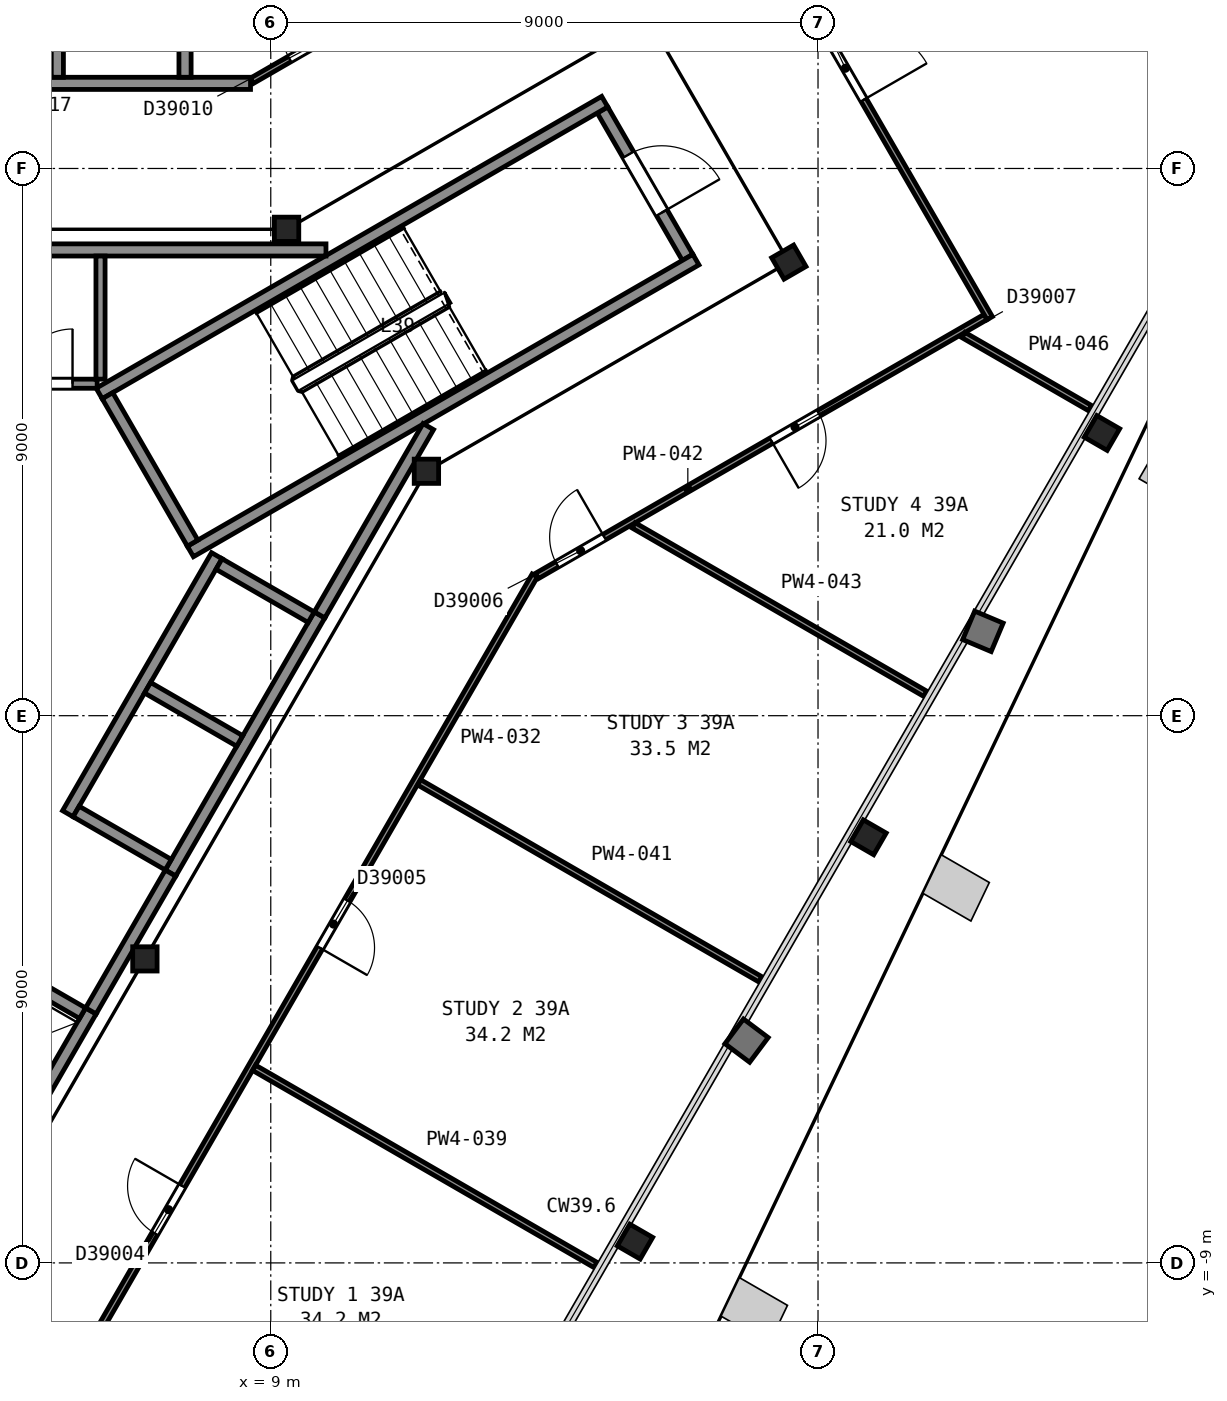
"""IFC4 building model, lengths in metres.
Left out: names, types, materials, properties, quantities, classifications, styles, units other than length and angle.
Written with IfcOpenShell. Run it as: python <this file> out.ifc"""

import sys

from ifc_helpers import new_model, si_unit, direction, frame, frame_2d, origin, origin_2d, place, context, subcontext, project, spatial, rectangle, i_section, extrude, element, fill, save


model = new_model("IFC4")
c1 = context("Model", 3, precision=1e-05, world=origin(), true_north=direction((0.0, 1.0)))
c2 = subcontext(c1, "Body", "Model", "MODEL_VIEW")
j1 = project(units=[si_unit("LENGTHUNIT", "METRE"), si_unit("PLANEANGLEUNIT", "RADIAN")], contexts=[c1])
p1 = place(None, origin())
s1 = spatial("IfcSite", under=j1, at=p1, CompositionType="ELEMENT")
p2 = place(p1, origin())
s2 = spatial("IfcBuilding", under=s1, at=p2, CompositionType="ELEMENT")
p3 = place(p2, frame((0.0, 0.0, 159.9)))
s3 = spatial("IfcBuildingStorey", under=s2, at=p3, CompositionType="ELEMENT", Elevation=159.9)
for number, where, z_axis, x_axis in (
    (1, (14.99, -8.65, 0.035), (0.0, 0.0, 1.0), (-0.5, -0.866, 0.0)),
    (2, (18.83, -2.0, 0.035), (0.0, 0.0, 1.0), (-0.5, -0.866, 0.0)),
):
    element("IfcColumn", number, at=place(p3, frame(where, z_axis=z_axis, x_axis=x_axis)), inside=s3, PredefinedType="COLUMN", context=c2, shape_type="SweptSolid", body=[
        extrude(i_section(OverallWidth=0.411, OverallDepth=0.434, WebThickness=0.036, FlangeThickness=0.057, FilletRadius=0.015, at=origin_2d()), origin(), (0.0, 0.0, 1.0), 3.665),
    ])
p4 = place(p3, frame((22.67, 4.65, 0.04), z_axis=(0.0, 0.0, 1.0), x_axis=(-0.5, -0.866025403784, 0.0)))
e3 = element("IfcColumn", 3, at=p4, inside=s3, PredefinedType="COLUMN", context=c2, shape_type="SweptSolid", body=[
    extrude(i_section(OverallWidth=0.411, OverallDepth=0.434, WebThickness=0.036, FlangeThickness=0.057, FilletRadius=0.015, at=origin_2d()), origin(), (0.0, 0.0, 1.0), 3.66),
])
p5 = place(p3, frame((11.56, 4.02, 0.0), z_axis=(0.0, 0.0, 1.0), x_axis=(1.0, 0.0, 0.0)))
e4 = element("IfcColumn", 4, at=p5, inside=s3, PredefinedType="COLUMN", context=c2, shape_type="SweptSolid", body=[
    extrude(i_section(OverallWidth=0.401, OverallDepth=0.399, WebThickness=0.025, FlangeThickness=0.04, FilletRadius=0.015, at=origin_2d()), origin(), (0.0, 0.0, 1.0), 3.7),
])
p6 = place(p3, frame((17.52, 7.46, 0.0), z_axis=(0.0, 0.0, 1.0), x_axis=(0.5, -0.866025403784, 0.0)))
e5 = element("IfcColumn", 5, at=p6, inside=s3, PredefinedType="COLUMN", context=c2, shape_type="SweptSolid", body=[
    extrude(i_section(OverallWidth=0.406, OverallDepth=0.417, WebThickness=0.03, FlangeThickness=0.048, FilletRadius=0.015, at=origin_2d()), origin(), (0.0, 0.0, 1.0), 3.7),
])
for number, where, z_axis, x_axis in (
    (6, (9.26, 8.0, 0.0), (0.0, 0.0, 1.0), (1.0, 0.0, 0.0)),
    (7, (6.93, -4.0, 0.0), (0.0, 0.0, 1.0), (1.0, 0.0, 0.0)),
):
    element("IfcColumn", number, at=place(p3, frame(where, z_axis=z_axis, x_axis=x_axis)), inside=s3, PredefinedType="COLUMN", context=c2, shape_type="SweptSolid", body=[
        extrude(i_section(OverallWidth=0.401, OverallDepth=0.399, WebThickness=0.025, FlangeThickness=0.04, FilletRadius=0.015, at=origin_2d()), origin(), (0.0, 0.0, 1.0), 3.7),
    ])
p7 = place(p3, frame((15.855, 7.538, 0.0), z_axis=(0.0, 0.0, 1.0), x_axis=(-0.500049511043, 0.865996816683, 0.0)))
e8 = element("IfcWall", 8, at=p7, inside=s3, PredefinedType="PARTITIONING", context=c2, shape_type="SweptSolid", body=[
    extrude(rectangle(XDim=2.8, YDim=0.2, at=frame_2d((1.4, 0.0))), origin(), (0.0, 0.0, 1.0), 3.45),
])
p8 = place(p7, frame((0.85, 0.0, 0.0)))
e9 = element("IfcOpeningElement", 9, at=p8, cuts=e8, PredefinedType="OPENING", context=c2, shape_type="SweptSolid", body=[
    extrude(rectangle(XDim=1.1, YDim=2.1, at=frame_2d((0.55, 1.05))), frame((0.0, 0.11, 0.0), z_axis=(0.0, -1.0, 0.0), x_axis=(1.0, 0.0, 0.0)), (0.0, 0.0, 1.0), 0.22),
])
for number, where, z_axis, x_axis in (
    (10, (6.178, 5.299, 0.0), (0.0, 0.0, 1.0), (0.866, 0.5, 0.0)),
    (11, (7.678, 2.701, 0.0), (0.0, 0.0, 1.0), (0.866, 0.5, 0.0)),
):
    element("IfcWall", number, at=place(p3, frame(where, z_axis=z_axis, x_axis=x_axis)), inside=s3, PredefinedType="PARTITIONING", context=c2, shape_type="SweptSolid", body=[
        extrude(rectangle(XDim=9.6, YDim=0.2, at=frame_2d((4.8, 0.0))), origin(), (0.0, 0.0, 1.0), 3.45),
    ])
p9 = place(p3, frame((7.715, 2.838, 0.0), z_axis=(0.0, 0.0, 1.0), x_axis=(-0.500049511043, 0.865996816683, 0.0)))
e12 = element("IfcWall", 12, at=p9, inside=s3, PredefinedType="PARTITIONING", context=c2, shape_type="SweptSolid", body=[
    extrude(rectangle(XDim=2.8, YDim=0.2, at=frame_2d((1.4, 0.0))), origin(), (0.0, 0.0, 1.0), 3.45),
])
p10 = place(p3, frame((4.766, -7.065, 0.0), z_axis=(0.0, 0.0, 1.0), x_axis=(0.499948979701, 0.866054858364, 0.0)))
e13 = element("IfcWall", 13, at=p10, inside=s3, PredefinedType="PARTITIONING", context=c2, shape_type="SweptSolid", body=[
    extrude(rectangle(XDim=2.55, YDim=0.2, at=frame_2d((1.275, 0.0))), origin(), (0.0, 0.0, 1.0), 3.7),
])
p11 = place(p3, frame((7.351, -2.587, 0.0), z_axis=(0.0, 0.0, 1.0), x_axis=(0.500002801628, 0.866023786258, 0.0)))
e14 = element("IfcWall", 14, at=p11, inside=s3, PredefinedType="PARTITIONING", context=c2, shape_type="SweptSolid", body=[
    extrude(rectangle(XDim=4.9, YDim=0.2, at=frame_2d((2.45, 0.0))), origin(), (0.0, 0.0, 1.0), 3.7),
])
p12 = place(p3, frame((5.663, -1.612, 0.0), z_axis=(0.0, 0.0, 1.0), x_axis=(0.49998122708, 0.866036242063, 0.0)))
e15 = element("IfcWall", 15, at=p12, inside=s3, PredefinedType="PARTITIONING", context=c2, shape_type="SweptSolid", body=[
    extrude(rectangle(XDim=4.9, YDim=0.2, at=frame_2d((2.45, 0.0))), origin(), (0.0, 0.0, 1.0), 3.7),
])
p13 = place(p3, frame((9.665, 1.62, 0.0), z_axis=(0.0, 0.0, 1.0), x_axis=(-0.866002029911, 0.500040482552, 0.0)))
e16 = element("IfcWall", 16, at=p13, inside=s3, PredefinedType="PARTITIONING", context=c2, shape_type="SweptSolid", body=[
    extrude(rectangle(XDim=1.75, YDim=0.2, at=frame_2d((0.875, 0.0))), origin(), (0.0, 0.0, 1.0), 3.7),
])
for number, where, z_axis, x_axis in (
    (17, (8.49, -0.416, 0.0), (0.0, 0.0, 1.0), (-0.866, 0.5, 0.0)),
    (18, (7.315, -2.451, 0.0), (0.0, 0.0, 1.0), (-0.866, 0.5, 0.0)),
):
    element("IfcWall", number, at=place(p3, frame(where, z_axis=z_axis, x_axis=x_axis)), inside=s3, PredefinedType="PARTITIONING", context=c2, shape_type="SweptSolid", body=[
        extrude(rectangle(XDim=1.75, YDim=0.2, at=frame_2d((0.875, 0.0))), origin(), (0.0, 0.0, 1.0), 3.7),
    ])
p14 = place(p3, frame((5.905, -4.893, 0.0), z_axis=(0.0, 0.0, 1.0), x_axis=(-0.866002029911, 0.500040482552, 0.0)))
e19 = element("IfcWall", 19, at=p14, inside=s3, PredefinedType="PARTITIONING", context=c2, shape_type="SweptSolid", body=[
    extrude(rectangle(XDim=1.75, YDim=0.2, at=frame_2d((0.875, 0.0))), origin(), (0.0, 0.0, 1.0), 3.7),
])
p15 = place(p3, frame((-3.933, 7.66, 0.0), z_axis=(0.0, 0.0, 1.0), x_axis=(1.0, 0.0, 0.0)))
e20 = element("IfcWall", 20, at=p15, inside=s3, PredefinedType="PARTITIONING", context=c2, shape_type="SweptSolid", body=[
    extrude(rectangle(XDim=13.841, YDim=0.2, at=frame_2d((6.92, 0.0))), origin(), (0.0, 0.0, 1.0), 3.45),
])
p16 = place(p3, frame((0.925, 5.46, 0.0), z_axis=(0.0, 0.0, 1.0), x_axis=(1.0, 0.0, 0.0)))
e21 = element("IfcWall", 21, at=p16, inside=s3, PredefinedType="PARTITIONING", context=c2, shape_type="SweptSolid", body=[
    extrude(rectangle(XDim=5.22, YDim=0.15, at=frame_2d((2.61, 0.0))), origin(), (0.0, 0.0, 1.0), 3.45),
])
p17 = place(p16, frame((3.915, 0.0, 0.0)))
e22 = element("IfcOpeningElement", 22, at=p17, cuts=e21, PredefinedType="OPENING", context=c2, shape_type="SweptSolid", body=[
    extrude(rectangle(XDim=0.9, YDim=2.1, at=frame_2d((0.45, 1.05))), frame((0.0, 0.085, 0.0), z_axis=(0.0, -1.0, 0.0), x_axis=(1.0, 0.0, 0.0)), (0.0, 0.0, 1.0), 0.17),
])
p18 = place(p3, frame((6.042, -4.855, 0.0), z_axis=(0.0, 0.0, 1.0), x_axis=(0.500252727967, 0.865879442048, 0.0)))
e23 = element("IfcWall", 23, at=p18, inside=s3, PredefinedType="PARTITIONING", context=c2, shape_type="SweptSolid", body=[
    extrude(rectangle(XDim=2.617, YDim=0.2, at=frame_2d((1.309, 0.0))), origin(), (0.0, 0.0, 1.0), 3.45),
])
p19 = place(p3, frame((6.2, 5.535, 0.0), z_axis=(0.0, 0.0, 1.0), x_axis=(0.0, 1.0, 0.0)))
e24 = element("IfcWall", 24, at=p19, inside=s3, PredefinedType="PARTITIONING", context=c2, shape_type="SweptSolid", body=[
    extrude(rectangle(XDim=2.025, YDim=0.15, at=frame_2d((1.013, 0.0))), origin(), (0.0, 0.0, 1.0), 3.45),
])
p20 = place(p3, frame((9.803, 1.658, 0.0), z_axis=(0.0, 0.0, 1.0), x_axis=(0.499943114462, 0.866058244174, 0.0)))
e25 = element("IfcWall", 25, at=p20, inside=s3, PredefinedType="PARTITIONING", context=c2, shape_type="SweptSolid", body=[
    extrude(rectangle(XDim=3.576, YDim=0.2, at=frame_2d((1.788, 0.0))), origin(), (0.0, 0.0, 1.0), 3.45),
])
p21 = place(p3, frame((-8.667, 10.4, 0.0), z_axis=(0.0, 0.0, 1.0), x_axis=(1.0, 0.0, 0.0)))
e26 = element("IfcWall", 26, at=p21, inside=s3, PredefinedType="PARTITIONING", context=c2, shape_type="SweptSolid", body=[
    extrude(rectangle(XDim=17.334, YDim=0.2, at=frame_2d((8.667, 0.0))), origin(), (0.0, 0.0, 1.0), 2.713),
])
p22 = place(p21, frame((9.211, 0.0, 0.0)))
e27 = element("IfcOpeningElement", 27, at=p22, cuts=e26, PredefinedType="OPENING", context=c2, shape_type="SweptSolid", body=[
    extrude(rectangle(XDim=0.9, YDim=2.1, at=frame_2d((0.45, 1.05))), frame((0.0, 0.11, 0.0), z_axis=(0.0, -1.0, 0.0), x_axis=(1.0, 0.0, 0.0)), (0.0, 0.0, 1.0), 0.22),
])
p23 = place(p21, frame((4.857, 0.0, 0.0)))
e28 = element("IfcOpeningElement", 28, at=p23, cuts=e26, PredefinedType="OPENING", context=c2, shape_type="SweptSolid", body=[
    extrude(rectangle(XDim=0.9, YDim=2.1, at=frame_2d((0.45, 1.05))), frame((0.0, 0.11, 0.0), z_axis=(0.0, -1.0, 0.0), x_axis=(1.0, 0.0, 0.0)), (0.0, 0.0, 1.0), 0.22),
])
p24 = place(p21, frame((1.0, 0.0, 0.0)))
e29 = element("IfcOpeningElement", 29, at=p24, cuts=e26, PredefinedType="OPENING", context=c2, shape_type="SweptSolid", body=[
    extrude(rectangle(XDim=0.9, YDim=2.1, at=frame_2d((0.45, 1.05))), frame((0.0, 0.11, 0.0), z_axis=(0.0, -1.0, 0.0), x_axis=(1.0, 0.0, 0.0)), (0.0, 0.0, 1.0), 0.22),
])
p25 = place(p3, frame((13.342, 2.306, 0.0), z_axis=(0.0, 0.0, 1.0), x_axis=(-0.49997635812, -0.866039053, 0.0)))
e30 = element("IfcWall", 30, at=p25, inside=s3, PredefinedType="PARTITIONING", context=c2, shape_type="SweptSolid", body=[
    extrude(rectangle(XDim=17.285, YDim=0.1, at=frame_2d((8.643, 0.0))), origin(), (0.0, 0.0, 1.0), 2.713),
])
p26 = place(p25, frame((15.585, 0.0, 0.0)))
e31 = element("IfcOpeningElement", 31, at=p26, cuts=e30, PredefinedType="OPENING", context=c2, shape_type="SweptSolid", body=[
    extrude(rectangle(XDim=0.9, YDim=2.1, at=frame_2d((0.45, 1.05))), frame((0.0, 0.06, 0.0), z_axis=(0.0, -1.0, 0.0), x_axis=(1.0, 0.0, 0.0)), (0.0, 0.0, 1.0), 0.12),
])
p27 = place(p25, frame((11.595, 0.0, 0.0)))
e32 = element("IfcOpeningElement", 32, at=p27, cuts=e30, PredefinedType="OPENING", context=c2, shape_type="SweptSolid", body=[
    extrude(rectangle(XDim=0.9, YDim=2.1, at=frame_2d((0.45, 1.05))), frame((0.0, 0.06, 0.0), z_axis=(0.0, -1.0, 0.0), x_axis=(1.0, 0.0, 0.0)), (0.0, 0.0, 1.0), 0.12),
])
p28 = place(p25, frame((6.171, 0.0, 0.0)))
e33 = element("IfcOpeningElement", 33, at=p28, cuts=e30, PredefinedType="OPENING", context=c2, shape_type="SweptSolid", body=[
    extrude(rectangle(XDim=0.9, YDim=2.1, at=frame_2d((0.45, 1.05))), frame((0.0, 0.06, 0.0), z_axis=(0.0, -1.0, 0.0), x_axis=(1.0, 0.0, 0.0)), (0.0, 0.0, 1.0), 0.12),
])
p29 = place(p3, frame((5.49, 10.5, 0.0), z_axis=(0.0, 0.0, 1.0), x_axis=(0.0, 1.0, 0.0)))
e34 = element("IfcWall", 34, at=p29, inside=s3, PredefinedType="PARTITIONING", context=c2, shape_type="SweptSolid", body=[
    extrude(rectangle(XDim=6.435, YDim=0.2, at=frame_2d((3.218, 0.0))), origin(), (0.0, 0.0, 1.0), 2.713),
])
p30 = place(p3, frame((7.59, 10.5, 0.0), z_axis=(0.0, 0.0, 1.0), x_axis=(0.0, 1.0, 0.0)))
e35 = element("IfcWall", 35, at=p30, inside=s3, PredefinedType="PARTITIONING", context=c2, shape_type="SweptSolid", body=[
    extrude(rectangle(XDim=2.8, YDim=0.2, at=frame_2d((1.4, 0.0))), origin(), (0.0, 0.0, 1.0), 2.713),
])
p31 = place(p3, frame((8.691, 10.442, 0.0), z_axis=(0.0, 0.0, 1.0), x_axis=(0.866070360466, 0.499922124658, 0.0)))
e36 = element("IfcWall", 36, at=p31, inside=s3, PredefinedType="PARTITIONING", context=c2, shape_type="SweptSolid", body=[
    extrude(rectangle(XDim=8.503, YDim=0.1, at=frame_2d((4.251, 0.0))), origin(), (0.0, 0.0, 1.0), 2.713),
])
p32 = place(p31, frame((4.758, 0.0, 0.0)))
e37 = element("IfcOpeningElement", 37, at=p32, cuts=e36, PredefinedType="OPENING", context=c2, shape_type="SweptSolid", body=[
    extrude(rectangle(XDim=0.9, YDim=2.1, at=frame_2d((0.45, 1.05))), frame((0.0, 0.06, 0.0), z_axis=(0.0, -1.0, 0.0), x_axis=(1.0, 0.0, 0.0)), (0.0, 0.0, 1.0), 0.12),
])
p33 = place(p31, frame((0.715, 0.0, 0.0)))
e38 = element("IfcOpeningElement", 38, at=p33, cuts=e36, PredefinedType="OPENING", context=c2, shape_type="SweptSolid", body=[
    extrude(rectangle(XDim=0.9, YDim=2.1, at=frame_2d((0.45, 1.05))), frame((0.0, 0.06, 0.0), z_axis=(0.0, -1.0, 0.0), x_axis=(1.0, 0.0, 0.0)), (0.0, 0.0, 1.0), 0.12),
])
p34 = place(p3, frame((8.725, -5.791, 0.0), z_axis=(0.0, 0.0, 1.0), x_axis=(0.865998075994, -0.500047330135, 0.0)))
e39 = element("IfcWall", 39, at=p34, inside=s3, PredefinedType="PARTITIONING", context=c2, shape_type="SweptSolid", body=[
    extrude(rectangle(XDim=6.483, YDim=0.1, at=frame_2d((3.242, 0.0))), origin(), (0.0, 0.0, 1.0), 2.713),
])
p35 = place(p3, frame((11.441, -1.096, 0.0), z_axis=(0.0, 0.0, 1.0), x_axis=(0.866019919364, -0.500009499175, 0.0)))
e40 = element("IfcWall", 40, at=p35, inside=s3, PredefinedType="PARTITIONING", context=c2, shape_type="SweptSolid", body=[
    extrude(rectangle(XDim=6.479, YDim=0.1, at=frame_2d((3.239, 0.0))), origin(), (0.0, 0.0, 1.0), 2.713),
])
p36 = place(p3, frame((20.756, 6.557, 0.0), z_axis=(0.0, 0.0, 1.0), x_axis=(-0.866069146081, -0.499924228466, 0.0)))
e41 = element("IfcWall", 41, at=p36, inside=s3, PredefinedType="PARTITIONING", context=c2, shape_type="SweptSolid", body=[
    extrude(rectangle(XDim=8.519, YDim=0.1, at=frame_2d((4.259, 0.0))), origin(), (0.0, 0.0, 1.0), 2.713),
])
p37 = place(p36, frame((7.239, 0.0, 0.0)))
e42 = element("IfcOpeningElement", 42, at=p37, cuts=e41, PredefinedType="OPENING", context=c2, shape_type="SweptSolid", body=[
    extrude(rectangle(XDim=0.9, YDim=2.1, at=frame_2d((0.45, 1.05))), frame((0.0, 0.06, 0.0), z_axis=(0.0, -1.0, 0.0), x_axis=(1.0, 0.0, 0.0)), (0.0, 0.0, 1.0), 0.12),
])
p38 = place(p36, frame((3.169, 0.0, 0.0)))
e43 = element("IfcOpeningElement", 43, at=p38, cuts=e41, PredefinedType="OPENING", context=c2, shape_type="SweptSolid", body=[
    extrude(rectangle(XDim=0.9, YDim=2.1, at=frame_2d((0.45, 1.05))), frame((0.0, 0.06, 0.0), z_axis=(0.0, -1.0, 0.0), x_axis=(1.0, 0.0, 0.0)), (0.0, 0.0, 1.0), 0.12),
])
p39 = place(p3, frame((14.968, 3.13, 0.0), z_axis=(0.0, 0.0, 1.0), x_axis=(0.866001282423, -0.500041777097, 0.0)))
e44 = element("IfcWall", 44, at=p39, inside=s3, PredefinedType="PARTITIONING", context=c2, shape_type="SweptSolid", body=[
    extrude(rectangle(XDim=5.537, YDim=0.1, at=frame_2d((2.769, 0.0))), origin(), (0.0, 0.0, 1.0), 2.713),
])
p40 = place(p3, frame((16.073, 14.761, 0.0), z_axis=(0.0, 0.0, 1.0), x_axis=(0.500297300687, -0.865853689098, 0.0)))
e45 = element("IfcWall", 45, at=p40, inside=s3, PredefinedType="PARTITIONING", context=c2, shape_type="SweptSolid", body=[
    extrude(rectangle(XDim=9.496, YDim=0.1, at=frame_2d((4.748, 0.0))), origin(), (0.0, 0.0, 1.0), 2.713),
])
p41 = place(p40, frame((4.15, 0.0, 0.0)))
e46 = element("IfcOpeningElement", 46, at=p41, cuts=e45, PredefinedType="OPENING", context=c2, shape_type="SweptSolid", body=[
    extrude(rectangle(XDim=1.2, YDim=2.1, at=frame_2d((0.6, 1.05))), frame((0.0, 0.06, 0.0), z_axis=(0.0, -1.0, 0.0), x_axis=(1.0, 0.0, 0.0)), (0.0, 0.0, 1.0), 0.12),
])
p42 = place(p3, frame((20.392, 6.261, 0.0), z_axis=(0.0, 0.0, 1.0), x_axis=(0.865953976614, -0.500123695086, 0.0)))
e47 = element("IfcWall", 47, at=p42, inside=s3, PredefinedType="PARTITIONING", context=c2, shape_type="SweptSolid", body=[
    extrude(rectangle(XDim=2.405, YDim=0.1, at=frame_2d((1.203, 0.0))), origin(), (0.0, 0.0, 1.0), 2.713),
])
p43 = place(p8, origin())
e48 = element("IfcDoor", 48, at=p43, inside=s3, OperationType="SINGLE_SWING_LEFT", PredefinedType="DOOR", context=c2, shape_type="SweptSolid", body=[
    extrude(rectangle(XDim=1.1, YDim=2.1, at=frame_2d((0.55, 1.05))), frame((0.0, 0.025, 0.0), z_axis=(0.0, -1.0, 0.0), x_axis=(1.0, 0.0, 0.0)), (0.0, 0.0, 1.0), 0.05),
])
fill(e9, e48)
p44 = place(p17, origin())
e49 = element("IfcDoor", 49, at=p44, inside=s3, OperationType="SINGLE_SWING_RIGHT", PredefinedType="DOOR", context=c2, shape_type="SweptSolid", body=[
    extrude(rectangle(XDim=0.9, YDim=2.1, at=frame_2d((0.45, 1.05))), frame((0.0, 0.025, 0.0), z_axis=(0.0, -1.0, 0.0), x_axis=(1.0, 0.0, 0.0)), (0.0, 0.0, 1.0), 0.05),
])
fill(e22, e49)
p45 = place(p27, origin())
e50 = element("IfcDoor", 50, at=p45, inside=s3, OperationType="SINGLE_SWING_LEFT", PredefinedType="DOOR", context=c2, shape_type="SweptSolid", body=[
    extrude(rectangle(XDim=0.9, YDim=2.1, at=frame_2d((0.45, 1.05))), frame((0.0, 0.025, 0.0), z_axis=(0.0, -1.0, 0.0), x_axis=(1.0, 0.0, 0.0)), (0.0, 0.0, 1.0), 0.05),
])
fill(e32, e50)
p46 = place(p28, origin())
e51 = element("IfcDoor", 51, at=p46, inside=s3, OperationType="SINGLE_SWING_RIGHT", PredefinedType="DOOR", context=c2, shape_type="SweptSolid", body=[
    extrude(rectangle(XDim=0.9, YDim=2.1, at=frame_2d((0.45, 1.05))), frame((0.0, 0.025, 0.0), z_axis=(0.0, -1.0, 0.0), x_axis=(1.0, 0.0, 0.0)), (0.0, 0.0, 1.0), 0.05),
])
fill(e33, e51)
p47 = place(p33, origin())
e52 = element("IfcDoor", 52, at=p47, inside=s3, OperationType="SINGLE_SWING_RIGHT", PredefinedType="DOOR", context=c2, shape_type="SweptSolid", body=[
    extrude(rectangle(XDim=0.9, YDim=2.1, at=frame_2d((0.45, 1.05))), frame((0.0, 0.025, 0.0), z_axis=(0.0, -1.0, 0.0), x_axis=(1.0, 0.0, 0.0)), (0.0, 0.0, 1.0), 0.05),
])
fill(e38, e52)
p48 = place(p37, origin())
e53 = element("IfcDoor", 53, at=p48, inside=s3, OperationType="SINGLE_SWING_LEFT", PredefinedType="DOOR", context=c2, shape_type="SweptSolid", body=[
    extrude(rectangle(XDim=0.9, YDim=2.1, at=frame_2d((0.45, 1.05))), frame((0.0, 0.025, 0.0), z_axis=(0.0, -1.0, 0.0), x_axis=(1.0, 0.0, 0.0)), (0.0, 0.0, 1.0), 0.05),
])
fill(e42, e53)
p49 = place(p38, origin())
e54 = element("IfcDoor", 54, at=p49, inside=s3, OperationType="SINGLE_SWING_RIGHT", PredefinedType="DOOR", context=c2, shape_type="SweptSolid", body=[
    extrude(rectangle(XDim=0.9, YDim=2.1, at=frame_2d((0.45, 1.05))), frame((0.0, 0.025, 0.0), z_axis=(0.0, -1.0, 0.0), x_axis=(1.0, 0.0, 0.0)), (0.0, 0.0, 1.0), 0.05),
])
fill(e43, e54)
p50 = place(p41, origin())
e55 = element("IfcDoor", 55, at=p50, inside=s3, OperationType="SINGLE_SWING_RIGHT", PredefinedType="DOOR", context=c2, shape_type="SweptSolid", body=[
    extrude(rectangle(XDim=1.2, YDim=2.1, at=frame_2d((0.6, 1.05))), frame((0.0, 0.025, 0.0), z_axis=(0.0, -1.0, 0.0), x_axis=(1.0, 0.0, 0.0)), (0.0, 0.0, 1.0), 0.05),
])
fill(e46, e55)
save(model, sys.argv[1])
